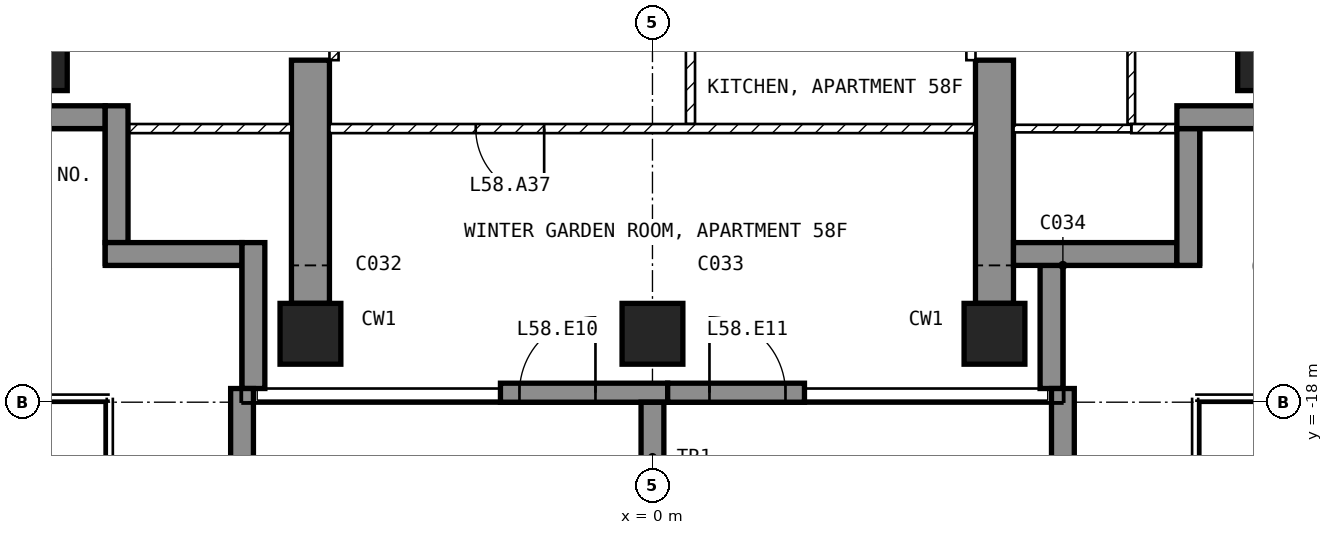
"""IFC4 building model, lengths in metres.
Left out: names, types, materials, properties, quantities, classifications, styles, units other than length and angle.
Written with IfcOpenShell. Run it as: python <this file> out.ifc"""

import sys

from ifc_helpers import new_model, si_unit, direction, frame, frame_2d, origin, origin_2d, place, context, subcontext, project, spatial, polyline, rectangle, outline, extrude, element, fill, save


model = new_model("IFC4")
c1 = context("Model", 3, precision=1e-05, world=origin(), true_north=direction((0.0, 1.0)))
c2 = subcontext(c1, "Body", "Model", "MODEL_VIEW")
j1 = project(units=[si_unit("LENGTHUNIT", "METRE"), si_unit("PLANEANGLEUNIT", "RADIAN")], contexts=[c1])
p1 = place(None, origin())
s1 = spatial("IfcSite", under=j1, at=p1, CompositionType="ELEMENT")
p2 = place(p1, origin())
s2 = spatial("IfcBuilding", under=s1, at=p2, CompositionType="ELEMENT")
p3 = place(p2, frame((0.0, 0.0, 232.5)))
s3 = spatial("IfcBuildingStorey", under=s2, at=p3, CompositionType="ELEMENT", Elevation=232.5)
for number, where, z_axis, x_axis in (
    (1, (-8.1, -13.5, -0.25), (0.0, 0.0, 1.0), (1.0, 0.0, 0.0)),
    (2, (-4.5, -17.1, -0.25), (0.0, 0.0, 1.0), (1.0, 0.0, 0.0)),
    (3, (0.0, -17.1, -0.25), (0.0, 0.0, 1.0), (1.0, 0.0, 0.0)),
    (4, (4.5, -17.1, -0.25), (0.0, 0.0, 1.0), (1.0, 0.0, 0.0)),
    (5, (8.1, -13.5, -0.25), (0.0, 0.0, 1.0), (1.0, 0.0, 0.0)),
):
    element("IfcColumn", number, at=place(p3, frame(where, z_axis=z_axis, x_axis=x_axis)), inside=s3, PredefinedType="COLUMN", context=c2, shape_type="SweptSolid", body=[
        extrude(rectangle(XDim=0.8, YDim=0.8, at=origin_2d()), origin(), (0.0, 0.0, 1.0), 3.5),
    ])
for number, where, z_axis, x_axis in (
    (6, (-4.75, -16.7, -0.25), (1.0, 0.0, 0.0), (0.0, 1.0, 0.0)),
    (7, (4.25, -16.7, -0.25), (1.0, 0.0, 0.0), (0.0, 1.0, 0.0)),
):
    element("IfcWall", number, at=place(p3, frame(where, z_axis=z_axis, x_axis=x_axis)), inside=s3, PredefinedType="SHEAR", context=c2, shape_type="SweptSolid", body=[
        extrude(outline(polyline([(0.0, 0.0), (3.2, 0.0), (3.2, 2.65), (5.6, 2.65), (5.6, 0.0), (7.7, 0.0), (7.7, 3.5), (0.0, 3.5), (0.0, 0.0)])), origin(), (0.0, 0.0, 1.0), 0.5),
    ])
p4 = place(p3, frame((-2.0, -17.875, 0.0), z_axis=(0.0, 0.0, 1.0), x_axis=(1.0, 0.0, 0.0)))
e8 = element("IfcWall", 8, at=p4, inside=s3, PredefinedType="SOLIDWALL", context=c2, shape_type="SweptSolid", body=[
    extrude(rectangle(XDim=2.2, YDim=0.25, at=frame_2d((1.1, 0.0))), origin(), (0.0, 0.0, 1.0), 3.25),
])
p5 = place(p4, frame((0.25, 0.0, 0.0)))
e9 = element("IfcOpeningElement", 9, at=p5, cuts=e8, PredefinedType="OPENING", context=c2, shape_type="SweptSolid", body=[
    extrude(rectangle(XDim=1.0, YDim=2.4, at=frame_2d((0.5, 1.2))), frame((0.0, 0.135, 0.0), z_axis=(0.0, -1.0, 0.0), x_axis=(1.0, 0.0, 0.0)), (0.0, 0.0, 1.0), 0.27),
])
p6 = place(p3, frame((0.2, -17.875, 0.0), z_axis=(0.0, 0.0, 1.0), x_axis=(1.0, 0.0, 0.0)))
e10 = element("IfcWall", 10, at=p6, inside=s3, PredefinedType="SOLIDWALL", context=c2, shape_type="SweptSolid", body=[
    extrude(rectangle(XDim=1.8, YDim=0.25, at=frame_2d((0.9, 0.0))), origin(), (0.0, 0.0, 1.0), 3.25),
])
p7 = place(p6, frame((0.55, 0.0, 0.0)))
e11 = element("IfcOpeningElement", 11, at=p7, cuts=e10, PredefinedType="OPENING", context=c2, shape_type="SweptSolid", body=[
    extrude(rectangle(XDim=1.0, YDim=2.4, at=frame_2d((0.5, 1.2))), frame((0.0, 0.135, 0.0), z_axis=(0.0, -1.0, 0.0), x_axis=(1.0, 0.0, 0.0)), (0.0, 0.0, 1.0), 0.27),
])
p8 = place(p3, frame((5.25, -17.82, 0.0), z_axis=(0.0, 0.0, 1.0), x_axis=(0.0, 1.0, 0.0)))
e12 = element("IfcWall", 12, at=p8, inside=s3, PredefinedType="SOLIDWALL", context=c2, shape_type="SweptSolid", body=[
    extrude(rectangle(XDim=1.62, YDim=0.3, at=frame_2d((0.81, 0.0))), origin(), (0.0, 0.0, 1.0), 3.25),
])
p9 = place(p3, frame((4.75, -16.05, 0.0), z_axis=(0.0, 0.0, 1.0), x_axis=(1.0, 0.0, 0.0)))
e13 = element("IfcWall", 13, at=p9, inside=s3, PredefinedType="SOLIDWALL", context=c2, shape_type="SweptSolid", body=[
    extrude(rectangle(XDim=2.15, YDim=0.3, at=frame_2d((1.075, 0.0))), origin(), (0.0, 0.0, 1.0), 3.25),
])
p10 = place(p3, frame((7.05, -16.2, 0.0), z_axis=(0.0, 0.0, 1.0), x_axis=(0.0, 1.0, 0.0)))
e14 = element("IfcWall", 14, at=p10, inside=s3, PredefinedType="SOLIDWALL", context=c2, shape_type="SweptSolid", body=[
    extrude(rectangle(XDim=1.8, YDim=0.3, at=frame_2d((0.9, 0.0))), origin(), (0.0, 0.0, 1.0), 3.25),
])
p11 = place(p3, frame((6.9, -14.25, 0.0), z_axis=(0.0, 0.0, 1.0), x_axis=(1.0, 0.0, 0.0)))
e15 = element("IfcWall", 15, at=p11, inside=s3, PredefinedType="SOLIDWALL", context=c2, shape_type="SweptSolid", body=[
    extrude(rectangle(XDim=1.85, YDim=0.3, at=frame_2d((0.925, 0.0))), origin(), (0.0, 0.0, 1.0), 3.25),
])
p12 = place(p3, frame((-8.75, -14.25, 0.0), z_axis=(0.0, 0.0, 1.0), x_axis=(1.0, 0.0, 0.0)))
e16 = element("IfcWall", 16, at=p12, inside=s3, PredefinedType="SOLIDWALL", context=c2, shape_type="SweptSolid", body=[
    extrude(rectangle(XDim=1.55, YDim=0.3, at=frame_2d((0.775, 0.0))), origin(), (0.0, 0.0, 1.0), 3.25),
])
p13 = place(p3, frame((-7.05, -14.1, 0.0), z_axis=(0.0, 0.0, 1.0), x_axis=(0.0, -1.0, 0.0)))
e17 = element("IfcWall", 17, at=p13, inside=s3, PredefinedType="SOLIDWALL", context=c2, shape_type="SweptSolid", body=[
    extrude(rectangle(XDim=1.8, YDim=0.3, at=frame_2d((0.9, 0.0))), origin(), (0.0, 0.0, 1.0), 3.25),
])
p14 = place(p3, frame((-7.2, -16.05, 0.0), z_axis=(0.0, 0.0, 1.0), x_axis=(1.0, 0.0, 0.0)))
e18 = element("IfcWall", 18, at=p14, inside=s3, PredefinedType="SOLIDWALL", context=c2, shape_type="SweptSolid", body=[
    extrude(rectangle(XDim=1.8, YDim=0.3, at=frame_2d((0.9, 0.0))), origin(), (0.0, 0.0, 1.0), 3.25),
])
p15 = place(p3, frame((-5.25, -15.9, 0.0), z_axis=(0.0, 0.0, 1.0), x_axis=(0.0, -1.0, 0.0)))
e19 = element("IfcWall", 19, at=p15, inside=s3, PredefinedType="SOLIDWALL", context=c2, shape_type="SweptSolid", body=[
    extrude(rectangle(XDim=1.92, YDim=0.3, at=frame_2d((0.96, 0.0))), origin(), (0.0, 0.0, 1.0), 3.25),
])
p16 = place(p3, frame((-5.4, -17.82, 0.0), z_axis=(0.0, 0.0, 1.0), x_axis=(0.0, -1.0, 0.0)))
e20 = element("IfcWall", 20, at=p16, inside=s3, PredefinedType="SOLIDWALL", context=c2, shape_type="SweptSolid", body=[
    extrude(rectangle(XDim=2.88, YDim=0.3, at=frame_2d((1.44, 0.0))), origin(), (0.0, 0.0, 1.0), 3.25),
])
p17 = place(p3, frame((0.0, -18.0, 0.0), z_axis=(0.0, 0.0, 1.0), x_axis=(0.0, -1.0, 0.0)))
e21 = element("IfcWall", 21, at=p17, inside=s3, PredefinedType="SOLIDWALL", context=c2, shape_type="SweptSolid", body=[
    extrude(rectangle(XDim=2.7, YDim=0.3, at=frame_2d((1.35, 0.0))), origin(), (0.0, 0.0, 1.0), 3.25),
])
p18 = place(p3, frame((5.4, -17.82, 0.0), z_axis=(0.0, 0.0, 1.0), x_axis=(0.0, -1.0, 0.0)))
e22 = element("IfcWall", 22, at=p18, inside=s3, PredefinedType="SOLIDWALL", context=c2, shape_type="SweptSolid", body=[
    extrude(rectangle(XDim=2.88, YDim=0.3, at=frame_2d((1.44, 0.0))), origin(), (0.0, 0.0, 1.0), 3.25),
])
p19 = place(p3, frame((0.5, -11.46, 0.0), z_axis=(0.0, 0.0, 1.0), x_axis=(0.0, -1.0, 0.0)))
e23 = element("IfcWall", 23, at=p19, inside=s3, PredefinedType="PARTITIONING", context=c2, shape_type="SweptSolid", body=[
    extrude(rectangle(XDim=2.88, YDim=0.12, at=frame_2d((1.44, 0.0))), origin(), (0.0, 0.0, 1.0), 3.25),
])
p20 = place(p19, frame((0.99, 0.0, 0.0)))
e24 = element("IfcOpeningElement", 24, at=p20, cuts=e23, PredefinedType="OPENING", context=c2, shape_type="SweptSolid", body=[
    extrude(rectangle(XDim=0.9, YDim=2.1, at=frame_2d((0.45, 1.05))), frame((0.0, 0.07, 0.0), z_axis=(0.0, -1.0, 0.0), x_axis=(1.0, 0.0, 0.0)), (0.0, 0.0, 1.0), 0.14),
])
p21 = place(p3, frame((4.25, -14.4, 0.0), z_axis=(0.0, 0.0, 1.0), x_axis=(-1.0, 0.0, 0.0)))
e25 = element("IfcWall", 25, at=p21, inside=s3, PredefinedType="PARTITIONING", context=c2, shape_type="SweptSolid", body=[
    extrude(rectangle(XDim=8.5, YDim=0.12, at=frame_2d((4.25, 0.0))), origin(), (0.0, 0.0, 1.0), 3.25),
])
p22 = place(p21, frame((5.675, 0.0, 0.0)))
e26 = element("IfcOpeningElement", 26, at=p22, cuts=e25, PredefinedType="OPENING", context=c2, shape_type="SweptSolid", body=[
    extrude(rectangle(XDim=0.9, YDim=2.1, at=frame_2d((0.45, 1.05))), frame((0.0, 0.07, 0.0), z_axis=(0.0, -1.0, 0.0), x_axis=(1.0, 0.0, 0.0)), (0.0, 0.0, 1.0), 0.14),
])
p23 = place(p3, frame((6.3, -14.34, 0.0), z_axis=(0.0, 0.0, 1.0), x_axis=(0.0, 1.0, 0.0)))
e27 = element("IfcWall", 27, at=p23, inside=s3, PredefinedType="PARTITIONING", context=c2, shape_type="SweptSolid", body=[
    extrude(rectangle(XDim=2.89, YDim=0.1, at=frame_2d((1.445, 0.0))), origin(), (0.0, 0.0, 1.0), 3.25),
])
p24 = place(p23, frame((1.02, 0.0, 0.0)))
e28 = element("IfcOpeningElement", 28, at=p24, cuts=e27, PredefinedType="OPENING", context=c2, shape_type="SweptSolid", body=[
    extrude(rectangle(XDim=0.85, YDim=2.1, at=frame_2d((0.425, 1.05))), frame((0.0, 0.06, 0.0), z_axis=(0.0, -1.0, 0.0), x_axis=(1.0, 0.0, 0.0)), (0.0, 0.0, 1.0), 0.12),
])
p25 = place(p3, frame((7.12, -14.4, 0.0), z_axis=(0.0, 0.0, 1.0), x_axis=(-1.0, 0.0, 0.0)))
e29 = element("IfcWall", 29, at=p25, inside=s3, PredefinedType="PARTITIONING", context=c2, shape_type="SweptSolid", body=[
    extrude(rectangle(XDim=0.82, YDim=0.12, at=frame_2d((0.41, 0.0))), origin(), (0.0, 0.0, 1.0), 3.25),
])
p26 = place(p3, frame((6.3, -14.4, 0.0), z_axis=(0.0, 0.0, 1.0), x_axis=(-1.0, 0.0, 0.0)))
e30 = element("IfcWall", 30, at=p26, inside=s3, PredefinedType="PARTITIONING", context=c2, shape_type="SweptSolid", body=[
    extrude(rectangle(XDim=1.55, YDim=0.1, at=frame_2d((0.775, 0.0))), origin(), (0.0, 0.0, 1.0), 3.25),
])
p27 = place(p3, frame((-4.75, -14.4, 0.0), z_axis=(0.0, 0.0, 1.0), x_axis=(-1.0, 0.0, 0.0)))
e31 = element("IfcWall", 31, at=p27, inside=s3, PredefinedType="PARTITIONING", context=c2, shape_type="SweptSolid", body=[
    extrude(rectangle(XDim=2.37, YDim=0.12, at=frame_2d((1.185, 0.0))), origin(), (0.0, 0.0, 1.0), 3.25),
])
p28 = place(p3, frame((4.19, -11.1, 0.0), z_axis=(0.0, 0.0, 1.0), x_axis=(0.0, -1.0, 0.0)))
e32 = element("IfcWall", 32, at=p28, inside=s3, PredefinedType="PARTITIONING", context=c2, shape_type="SweptSolid", body=[
    extrude(rectangle(XDim=2.4, YDim=0.12, at=frame_2d((1.2, 0.0))), origin(), (0.0, 0.0, 1.0), 2.4),
])
p29 = place(p28, frame((0.75, 0.0, 0.0)))
e33 = element("IfcOpeningElement", 33, at=p29, cuts=e32, PredefinedType="OPENING", context=c2, shape_type="SweptSolid", body=[
    extrude(rectangle(XDim=0.9, YDim=2.1, at=frame_2d((0.45, 1.05))), frame((0.0, 0.07, 0.0), z_axis=(0.0, -1.0, 0.0), x_axis=(1.0, 0.0, 0.0)), (0.0, 0.0, 1.0), 0.14),
])
p30 = place(p3, frame((-4.19, -11.1, 0.0), z_axis=(0.0, 0.0, 1.0), x_axis=(0.0, -1.0, 0.0)))
e34 = element("IfcWall", 34, at=p30, inside=s3, PredefinedType="PARTITIONING", context=c2, shape_type="SweptSolid", body=[
    extrude(rectangle(XDim=2.4, YDim=0.12, at=frame_2d((1.2, 0.0))), origin(), (0.0, 0.0, 1.0), 2.4),
])
p31 = place(p30, frame((0.75, 0.0, 0.0)))
e35 = element("IfcOpeningElement", 35, at=p31, cuts=e34, PredefinedType="OPENING", context=c2, shape_type="SweptSolid", body=[
    extrude(rectangle(XDim=0.9, YDim=2.1, at=frame_2d((0.45, 1.05))), frame((0.0, 0.07, 0.0), z_axis=(0.0, -1.0, 0.0), x_axis=(1.0, 0.0, 0.0)), (0.0, 0.0, 1.0), 0.14),
])
p32 = place(p5, origin())
e36 = element("IfcDoor", 36, at=p32, inside=s3, OperationType="SINGLE_SWING_RIGHT", PredefinedType="DOOR", context=c2, shape_type="SweptSolid", body=[
    extrude(rectangle(XDim=1.0, YDim=2.4, at=frame_2d((0.5, 1.2))), frame((0.0, 0.025, 0.0), z_axis=(0.0, -1.0, 0.0), x_axis=(1.0, 0.0, 0.0)), (0.0, 0.0, 1.0), 0.05),
])
fill(e9, e36)
p33 = place(p7, origin())
e37 = element("IfcDoor", 37, at=p33, inside=s3, OperationType="SINGLE_SWING_LEFT", PredefinedType="DOOR", context=c2, shape_type="SweptSolid", body=[
    extrude(rectangle(XDim=1.0, YDim=2.4, at=frame_2d((0.5, 1.2))), frame((0.0, 0.025, 0.0), z_axis=(0.0, -1.0, 0.0), x_axis=(1.0, 0.0, 0.0)), (0.0, 0.0, 1.0), 0.05),
])
fill(e11, e37)
p34 = place(p22, origin())
e38 = element("IfcDoor", 38, at=p34, inside=s3, OperationType="SINGLE_SWING_LEFT", PredefinedType="DOOR", context=c2, shape_type="SweptSolid", body=[
    extrude(rectangle(XDim=0.9, YDim=2.1, at=frame_2d((0.45, 1.05))), frame((0.0, 0.025, 0.0), z_axis=(0.0, -1.0, 0.0), x_axis=(1.0, 0.0, 0.0)), (0.0, 0.0, 1.0), 0.05),
])
fill(e26, e38)
save(model, sys.argv[1])
